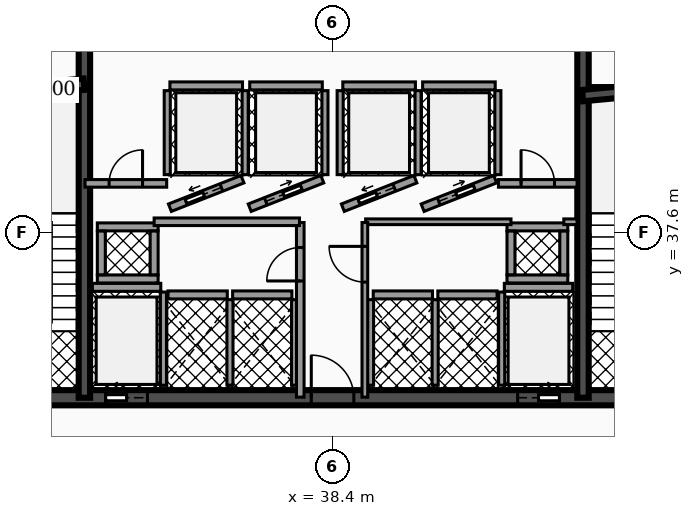
"""IFC4 building model, lengths in metres.
Left out: names, types, materials, properties, quantities, classifications, styles, units other than length and angle.
Written with IfcOpenShell. Run it as: python <this file> out.ifc"""

import sys

from ifc_helpers import new_model, si_unit, direction, frame, frame_2d, origin, place, context, subcontext, project, spatial, rectangle, extrude, element, fill, save


model = new_model("IFC4")
c1 = context("Model", 3, precision=1e-05, world=origin(), true_north=direction((0.0, 1.0)))
c2 = subcontext(c1, "Body", "Model", "MODEL_VIEW")
j1 = project(units=[si_unit("LENGTHUNIT", "METRE"), si_unit("PLANEANGLEUNIT", "RADIAN")], contexts=[c1])
p1 = place(None, origin())
s1 = spatial("IfcSite", under=j1, at=p1, CompositionType="ELEMENT")
p2 = place(p1, origin())
s2 = spatial("IfcBuilding", under=s1, at=p2, CompositionType="ELEMENT")
p3 = place(p2, frame((0.0, 0.0, 31.62)))
s3 = spatial("IfcBuildingStorey", under=s2, at=p3, CompositionType="ELEMENT", Elevation=31.62)
p4 = place(p3, frame((28.4, 33.25, 0.0), z_axis=(0.0, 0.0, 1.0), x_axis=(1.0, 0.0, 0.0)))
e1 = element("IfcWall", 1, at=p4, inside=s3, PredefinedType="SHEAR", context=c2, shape_type="SweptSolid", body=[
    extrude(rectangle(XDim=20.06, YDim=0.4, at=frame_2d((10.03, 0.0))), origin(), (0.0, 0.0, 1.0), 3.82),
])
p5 = place(p4, frame((4.03, 0.0, 0.0)))
e2 = element("IfcOpeningElement", 2, at=p5, cuts=e1, PredefinedType="OPENING", context=c2, shape_type="SweptSolid", body=[
    extrude(rectangle(XDim=1.1, YDim=2.15, at=frame_2d((0.55, 1.075))), frame((0.0, 0.21, 0.0), z_axis=(0.0, -1.0, 0.0), x_axis=(1.0, 0.0, 0.0)), (0.0, 0.0, 1.0), 0.42),
])
p6 = place(p4, frame((14.87, 0.0, 0.0)))
e3 = element("IfcOpeningElement", 3, at=p6, cuts=e1, PredefinedType="OPENING", context=c2, shape_type="SweptSolid", body=[
    extrude(rectangle(XDim=1.1, YDim=2.15, at=frame_2d((0.55, 1.075))), frame((0.0, 0.21, 0.0), z_axis=(0.0, -1.0, 0.0), x_axis=(1.0, 0.0, 0.0)), (0.0, 0.0, 1.0), 0.42),
])
p7 = place(p4, frame((1.31, 0.0, 0.0)))
e4 = element("IfcOpeningElement", 4, at=p7, cuts=e1, PredefinedType="OPENING", context=c2, shape_type="SweptSolid", body=[
    extrude(rectangle(XDim=1.1, YDim=2.2, at=frame_2d((0.55, 1.1))), frame((0.0, 0.21, 0.0), z_axis=(0.0, -1.0, 0.0), x_axis=(1.0, 0.0, 0.0)), (0.0, 0.0, 1.0), 0.42),
])
p8 = place(p4, frame((9.44, 0.0, 0.0)))
e5 = element("IfcOpeningElement", 5, at=p8, cuts=e1, PredefinedType="OPENING", context=c2, shape_type="SweptSolid", body=[
    extrude(rectangle(XDim=1.12, YDim=2.05, at=frame_2d((0.56, 1.025))), frame((0.0, 0.21, 0.0), z_axis=(0.0, -1.0, 0.0), x_axis=(1.0, 0.0, 0.0)), (0.0, 0.0, 1.0), 0.42),
])
p9 = place(p4, frame((17.65, 0.0, 0.0)))
e6 = element("IfcOpeningElement", 6, at=p9, cuts=e1, PredefinedType="OPENING", context=c2, shape_type="SweptSolid", body=[
    extrude(rectangle(XDim=1.1, YDim=2.2, at=frame_2d((0.55, 1.1))), frame((0.0, 0.21, 0.0), z_axis=(0.0, -1.0, 0.0), x_axis=(1.0, 0.0, 0.0)), (0.0, 0.0, 1.0), 0.42),
])
for number, where, z_axis, x_axis in (
    (7, (31.87, 33.25, 0.0), (0.0, 0.0, 1.0), (0.0, 1.0, 0.0)),
    (8, (44.99, 33.25, 0.0), (0.0, 0.0, 1.0), (0.0, 1.0, 0.0)),
):
    element("IfcWall", number, at=place(p3, frame(where, z_axis=z_axis, x_axis=x_axis)), inside=s3, PredefinedType="SHEAR", context=c2, shape_type="SweptSolid", body=[
        extrude(rectangle(XDim=10.2, YDim=0.3, at=frame_2d((5.1, 0.0))), origin(), (0.0, 0.0, 1.0), 3.82),
    ])
p10 = place(p3, frame((28.64, 41.2, 0.0), z_axis=(0.0, 0.0, 1.0), x_axis=(0.995687118776, 0.092774789157, 0.0)))
e9 = element("IfcWall", 9, at=p10, inside=s3, PredefinedType="SHEAR", context=c2, shape_type="SweptSolid", body=[
    extrude(rectangle(XDim=3.234, YDim=0.3, at=frame_2d((1.617, 0.0))), origin(), (0.0, 0.0, 1.0), 3.82),
])
p11 = place(p3, frame((44.98, 41.2, 0.0), z_axis=(0.0, 0.0, 1.0), x_axis=(0.995686468965, 0.09278176286, 0.0)))
e10 = element("IfcWall", 10, at=p11, inside=s3, PredefinedType="SHEAR", context=c2, shape_type="SweptSolid", body=[
    extrude(rectangle(XDim=3.234, YDim=0.3, at=frame_2d((1.617, 0.0))), origin(), (0.0, 0.0, 1.0), 3.82),
])
p12 = place(p3, frame((32.08, 36.155, 0.0), z_axis=(0.0, 0.0, 1.0), x_axis=(1.0, 0.0, 0.0)))
e11 = element("IfcWall", 11, at=p12, inside=s3, PredefinedType="SOLIDWALL", context=c2, shape_type="SweptSolid", body=[
    extrude(rectangle(XDim=1.8, YDim=0.21, at=frame_2d((0.9, 0.0))), origin(), (0.0, 0.0, 1.0), 2.792),
])
p13 = place(p3, frame((33.95, 33.58, 0.0), z_axis=(0.0, 0.0, 1.0), x_axis=(0.0, 1.0, 0.0)))
e12 = element("IfcWall", 12, at=p13, inside=s3, PredefinedType="SOLIDWALL", context=c2, shape_type="SweptSolid", body=[
    extrude(rectangle(XDim=2.45, YDim=0.16, at=frame_2d((1.225, 0.0))), origin(), (0.0, 0.0, 1.0), 2.792),
])
p14 = place(p3, frame((42.92, 36.155, 0.0), z_axis=(0.0, 0.0, 1.0), x_axis=(1.0, 0.0, 0.0)))
e13 = element("IfcWall", 13, at=p14, inside=s3, PredefinedType="SOLIDWALL", context=c2, shape_type="SweptSolid", body=[
    extrude(rectangle(XDim=1.8, YDim=0.21, at=frame_2d((0.9, 0.0))), origin(), (0.0, 0.0, 1.0), 2.792),
])
p15 = place(p3, frame((42.85, 33.58, 0.0), z_axis=(0.0, 0.0, 1.0), x_axis=(0.0, 1.0, 0.0)))
e14 = element("IfcWall", 14, at=p15, inside=s3, PredefinedType="SOLIDWALL", context=c2, shape_type="SweptSolid", body=[
    extrude(rectangle(XDim=2.45, YDim=0.16, at=frame_2d((1.225, 0.0))), origin(), (0.0, 0.0, 1.0), 2.792),
])
p16 = place(p3, frame((34.12, 38.25, 0.0), z_axis=(0.0, 0.0, 1.0), x_axis=(0.930804993012, 0.36551616241, 0.0)))
e15 = element("IfcWall", 15, at=p16, inside=s3, PredefinedType="SOLIDWALL", context=c2, shape_type="SweptSolid", body=[
    extrude(rectangle(XDim=2.052, YDim=0.21, at=frame_2d((1.026, 0.0))), origin(), (0.0, 0.0, 1.0), 2.792),
])
p17 = place(p16, frame((0.455, 0.0, 0.0)))
e16 = element("IfcOpeningElement", 16, at=p17, cuts=e15, PredefinedType="OPENING", context=c2, shape_type="SweptSolid", body=[
    extrude(rectangle(XDim=1.0, YDim=2.1, at=frame_2d((0.5, 1.05))), frame((0.0, 0.115, 0.0), z_axis=(0.0, -1.0, 0.0), x_axis=(1.0, 0.0, 0.0)), (0.0, 0.0, 1.0), 0.23),
])
p18 = place(p3, frame((34.12, 41.455, 0.0), z_axis=(0.0, 0.0, 1.0), x_axis=(1.0, 0.0, 0.0)))
e17 = element("IfcWall", 17, at=p18, inside=s3, PredefinedType="SOLIDWALL", context=c2, shape_type="SweptSolid", body=[
    extrude(rectangle(XDim=1.91, YDim=0.21, at=frame_2d((0.955, 0.0))), origin(), (0.0, 0.0, 1.0), 2.792),
])
for number, where, z_axis, x_axis in (
    (18, (34.05, 39.12, 0.0), (0.0, 0.0, 1.0), (0.0, 1.0, 0.0)),
    (19, (36.1, 39.12, 0.0), (0.0, 0.0, 1.0), (0.0, 1.0, 0.0)),
):
    element("IfcWall", number, at=place(p3, frame(where, z_axis=z_axis, x_axis=x_axis)), inside=s3, PredefinedType="SOLIDWALL", context=c2, shape_type="SweptSolid", body=[
        extrude(rectangle(XDim=2.21, YDim=0.16, at=frame_2d((1.105, 0.0))), origin(), (0.0, 0.0, 1.0), 2.792),
    ])
p19 = place(p3, frame((36.22, 38.25, 0.0), z_axis=(0.0, 0.0, 1.0), x_axis=(0.930804993012, 0.36551616241, 0.0)))
e20 = element("IfcWall", 20, at=p19, inside=s3, PredefinedType="SOLIDWALL", context=c2, shape_type="SweptSolid", body=[
    extrude(rectangle(XDim=2.052, YDim=0.21, at=frame_2d((1.026, 0.0))), origin(), (0.0, 0.0, 1.0), 2.792),
])
p20 = place(p19, frame((0.455, 0.0, 0.0)))
e21 = element("IfcOpeningElement", 21, at=p20, cuts=e20, PredefinedType="OPENING", context=c2, shape_type="SweptSolid", body=[
    extrude(rectangle(XDim=1.0, YDim=2.1, at=frame_2d((0.5, 1.05))), frame((0.0, 0.115, 0.0), z_axis=(0.0, -1.0, 0.0), x_axis=(1.0, 0.0, 0.0)), (0.0, 0.0, 1.0), 0.23),
])
p21 = place(p3, frame((36.22, 41.455, 0.0), z_axis=(0.0, 0.0, 1.0), x_axis=(1.0, 0.0, 0.0)))
e22 = element("IfcWall", 22, at=p21, inside=s3, PredefinedType="SOLIDWALL", context=c2, shape_type="SweptSolid", body=[
    extrude(rectangle(XDim=1.91, YDim=0.21, at=frame_2d((0.955, 0.0))), origin(), (0.0, 0.0, 1.0), 2.792),
])
p22 = place(p3, frame((38.2, 39.12, 0.0), z_axis=(0.0, 0.0, 1.0), x_axis=(0.0, 1.0, 0.0)))
e23 = element("IfcWall", 23, at=p22, inside=s3, PredefinedType="SOLIDWALL", context=c2, shape_type="SweptSolid", body=[
    extrude(rectangle(XDim=2.21, YDim=0.16, at=frame_2d((1.105, 0.0))), origin(), (0.0, 0.0, 1.0), 2.792),
])
p23 = place(p3, frame((38.67, 38.25, 0.0), z_axis=(0.0, 0.0, 1.0), x_axis=(0.930820886763, 0.3654756856, 0.0)))
e24 = element("IfcWall", 24, at=p23, inside=s3, PredefinedType="SOLIDWALL", context=c2, shape_type="SweptSolid", body=[
    extrude(rectangle(XDim=2.052, YDim=0.21, at=frame_2d((1.026, 0.0))), origin(), (0.0, 0.0, 1.0), 2.792),
])
p24 = place(p23, frame((0.455, 0.0, 0.0)))
e25 = element("IfcOpeningElement", 25, at=p24, cuts=e24, PredefinedType="OPENING", context=c2, shape_type="SweptSolid", body=[
    extrude(rectangle(XDim=1.0, YDim=2.1, at=frame_2d((0.5, 1.05))), frame((0.0, 0.115, 0.0), z_axis=(0.0, -1.0, 0.0), x_axis=(1.0, 0.0, 0.0)), (0.0, 0.0, 1.0), 0.23),
])
p25 = place(p3, frame((38.67, 41.455, 0.0), z_axis=(0.0, 0.0, 1.0), x_axis=(1.0, 0.0, 0.0)))
e26 = element("IfcWall", 26, at=p25, inside=s3, PredefinedType="SOLIDWALL", context=c2, shape_type="SweptSolid", body=[
    extrude(rectangle(XDim=1.91, YDim=0.21, at=frame_2d((0.955, 0.0))), origin(), (0.0, 0.0, 1.0), 2.792),
])
for number, where, z_axis, x_axis in (
    (27, (38.6, 39.12, 0.0), (0.0, 0.0, 1.0), (0.0, 1.0, 0.0)),
    (28, (40.65, 39.12, 0.0), (0.0, 0.0, 1.0), (0.0, 1.0, 0.0)),
):
    element("IfcWall", number, at=place(p3, frame(where, z_axis=z_axis, x_axis=x_axis)), inside=s3, PredefinedType="SOLIDWALL", context=c2, shape_type="SweptSolid", body=[
        extrude(rectangle(XDim=2.21, YDim=0.16, at=frame_2d((1.105, 0.0))), origin(), (0.0, 0.0, 1.0), 2.792),
    ])
p26 = place(p3, frame((40.77, 38.25, 0.0), z_axis=(0.0, 0.0, 1.0), x_axis=(0.930804993012, 0.36551616241, 0.0)))
e29 = element("IfcWall", 29, at=p26, inside=s3, PredefinedType="SOLIDWALL", context=c2, shape_type="SweptSolid", body=[
    extrude(rectangle(XDim=2.052, YDim=0.21, at=frame_2d((1.026, 0.0))), origin(), (0.0, 0.0, 1.0), 2.792),
])
p27 = place(p26, frame((0.455, 0.0, 0.0)))
e30 = element("IfcOpeningElement", 30, at=p27, cuts=e29, PredefinedType="OPENING", context=c2, shape_type="SweptSolid", body=[
    extrude(rectangle(XDim=1.0, YDim=2.1, at=frame_2d((0.5, 1.05))), frame((0.0, 0.115, 0.0), z_axis=(0.0, -1.0, 0.0), x_axis=(1.0, 0.0, 0.0)), (0.0, 0.0, 1.0), 0.23),
])
p28 = place(p3, frame((40.77, 41.455, 0.0), z_axis=(0.0, 0.0, 1.0), x_axis=(1.0, 0.0, 0.0)))
e31 = element("IfcWall", 31, at=p28, inside=s3, PredefinedType="SOLIDWALL", context=c2, shape_type="SweptSolid", body=[
    extrude(rectangle(XDim=1.91, YDim=0.21, at=frame_2d((0.955, 0.0))), origin(), (0.0, 0.0, 1.0), 2.792),
])
p29 = place(p3, frame((42.75, 39.12, 0.0), z_axis=(0.0, 0.0, 1.0), x_axis=(0.0, 1.0, 0.0)))
e32 = element("IfcWall", 32, at=p29, inside=s3, PredefinedType="SOLIDWALL", context=c2, shape_type="SweptSolid", body=[
    extrude(rectangle(XDim=2.21, YDim=0.16, at=frame_2d((1.105, 0.0))), origin(), (0.0, 0.0, 1.0), 2.792),
])
p30 = place(p3, frame((34.07, 35.955, 0.0), z_axis=(0.0, 0.0, 1.0), x_axis=(1.0, 0.0, 0.0)))
e33 = element("IfcWall", 33, at=p30, inside=s3, PredefinedType="SOLIDWALL", context=c2, shape_type="SweptSolid", body=[
    extrude(rectangle(XDim=1.56, YDim=0.21, at=frame_2d((0.78, 0.0))), origin(), (0.0, 0.0, 1.0), 2.792),
])
p31 = place(p3, frame((35.7, 33.58, 0.0), z_axis=(0.0, 0.0, 1.0), x_axis=(0.0, 1.0, 0.0)))
e34 = element("IfcWall", 34, at=p31, inside=s3, PredefinedType="SOLIDWALL", context=c2, shape_type="SweptSolid", body=[
    extrude(rectangle(XDim=2.25, YDim=0.16, at=frame_2d((1.125, 0.0))), origin(), (0.0, 0.0, 1.0), 2.792),
])
p32 = place(p3, frame((35.77, 35.955, 0.0), z_axis=(0.0, 0.0, 1.0), x_axis=(1.0, 0.0, 0.0)))
e35 = element("IfcWall", 35, at=p32, inside=s3, PredefinedType="SOLIDWALL", context=c2, shape_type="SweptSolid", body=[
    extrude(rectangle(XDim=1.56, YDim=0.21, at=frame_2d((0.78, 0.0))), origin(), (0.0, 0.0, 1.0), 2.792),
])
p33 = place(p3, frame((37.4, 33.58, 0.0), z_axis=(0.0, 0.0, 1.0), x_axis=(0.0, 1.0, 0.0)))
e36 = element("IfcWall", 36, at=p33, inside=s3, PredefinedType="SOLIDWALL", context=c2, shape_type="SweptSolid", body=[
    extrude(rectangle(XDim=2.25, YDim=0.16, at=frame_2d((1.125, 0.0))), origin(), (0.0, 0.0, 1.0), 2.792),
])
p34 = place(p3, frame((39.47, 35.955, 0.0), z_axis=(0.0, 0.0, 1.0), x_axis=(1.0, 0.0, 0.0)))
e37 = element("IfcWall", 37, at=p34, inside=s3, PredefinedType="SOLIDWALL", context=c2, shape_type="SweptSolid", body=[
    extrude(rectangle(XDim=1.56, YDim=0.21, at=frame_2d((0.78, 0.0))), origin(), (0.0, 0.0, 1.0), 2.792),
])
for number, where, z_axis, x_axis in (
    (38, (39.4, 33.58, 0.0), (0.0, 0.0, 1.0), (0.0, 1.0, 0.0)),
    (39, (41.1, 33.58, 0.0), (0.0, 0.0, 1.0), (0.0, 1.0, 0.0)),
):
    element("IfcWall", number, at=place(p3, frame(where, z_axis=z_axis, x_axis=x_axis)), inside=s3, PredefinedType="SOLIDWALL", context=c2, shape_type="SweptSolid", body=[
        extrude(rectangle(XDim=2.25, YDim=0.16, at=frame_2d((1.125, 0.0))), origin(), (0.0, 0.0, 1.0), 2.792),
    ])
p35 = place(p3, frame((41.17, 35.955, 0.0), z_axis=(0.0, 0.0, 1.0), x_axis=(1.0, 0.0, 0.0)))
e40 = element("IfcWall", 40, at=p35, inside=s3, PredefinedType="SOLIDWALL", context=c2, shape_type="SweptSolid", body=[
    extrude(rectangle(XDim=1.56, YDim=0.21, at=frame_2d((0.78, 0.0))), origin(), (0.0, 0.0, 1.0), 2.792),
])
for number, where, z_axis, x_axis in (
    (41, (32.21, 36.375, 0.0), (0.0, 0.0, 1.0), (1.0, 0.0, 0.0)),
    (42, (32.21, 37.745, 0.0), (0.0, 0.0, 1.0), (1.0, 0.0, 0.0)),
):
    element("IfcWall", number, at=place(p3, frame(where, z_axis=z_axis, x_axis=x_axis)), inside=s3, PredefinedType="SOLIDWALL", context=c2, shape_type="SweptSolid", body=[
        extrude(rectangle(XDim=1.6, YDim=0.21, at=frame_2d((0.8, 0.0))), origin(), (0.0, 0.0, 1.0), 3.82),
    ])
for number, where, z_axis, x_axis in (
    (43, (32.315, 36.485, 0.0), (0.0, 0.0, 1.0), (0.0, 1.0, 0.0)),
    (44, (33.705, 36.485, 0.0), (0.0, 0.0, 1.0), (0.0, 1.0, 0.0)),
):
    element("IfcWall", number, at=place(p3, frame(where, z_axis=z_axis, x_axis=x_axis)), inside=s3, PredefinedType="SOLIDWALL", context=c2, shape_type="SweptSolid", body=[
        extrude(rectangle(XDim=1.15, YDim=0.21, at=frame_2d((0.575, 0.0))), origin(), (0.0, 0.0, 1.0), 3.82),
    ])
for number, where, z_axis, x_axis in (
    (45, (42.99, 36.375, 0.0), (0.0, 0.0, 1.0), (1.0, 0.0, 0.0)),
    (46, (42.99, 37.745, 0.0), (0.0, 0.0, 1.0), (1.0, 0.0, 0.0)),
):
    element("IfcWall", number, at=place(p3, frame(where, z_axis=z_axis, x_axis=x_axis)), inside=s3, PredefinedType="SOLIDWALL", context=c2, shape_type="SweptSolid", body=[
        extrude(rectangle(XDim=1.6, YDim=0.21, at=frame_2d((0.8, 0.0))), origin(), (0.0, 0.0, 1.0), 3.82),
    ])
for number, where, z_axis, x_axis in (
    (47, (43.095, 36.485, 0.0), (0.0, 0.0, 1.0), (0.0, 1.0, 0.0)),
    (48, (44.485, 36.485, 0.0), (0.0, 0.0, 1.0), (0.0, 1.0, 0.0)),
):
    element("IfcWall", number, at=place(p3, frame(where, z_axis=z_axis, x_axis=x_axis)), inside=s3, PredefinedType="SOLIDWALL", context=c2, shape_type="SweptSolid", body=[
        extrude(rectangle(XDim=1.15, YDim=0.21, at=frame_2d((0.575, 0.0))), origin(), (0.0, 0.0, 1.0), 3.82),
    ])
p36 = place(p3, frame((37.55, 33.265, 0.0), z_axis=(0.0, 0.0, 1.0), x_axis=(0.0, 1.0, 0.0)))
e49 = element("IfcWall", 49, at=p36, inside=s3, PredefinedType="PARTITIONING", context=c2, shape_type="SweptSolid", body=[
    extrude(rectangle(XDim=4.595, YDim=0.2, at=frame_2d((2.298, 0.0))), origin(), (0.0, 0.0, 1.0), 2.777),
])
p37 = place(p36, frame((3.058, 0.0, 0.0)))
e50 = element("IfcOpeningElement", 50, at=p37, cuts=e49, PredefinedType="OPENING", context=c2, shape_type="SweptSolid", body=[
    extrude(rectangle(XDim=0.88, YDim=2.05, at=frame_2d((0.44, 1.025))), frame((0.0, 0.11, 0.0), z_axis=(0.0, -1.0, 0.0), x_axis=(1.0, 0.0, 0.0)), (0.0, 0.0, 1.0), 0.22),
])
p38 = place(p3, frame((33.705, 37.88, 0.0), z_axis=(0.0, 0.0, 1.0), x_axis=(1.0, 0.0, 0.0)))
e51 = element("IfcWall", 51, at=p38, inside=s3, PredefinedType="PARTITIONING", context=c2, shape_type="SweptSolid", body=[
    extrude(rectangle(XDim=3.825, YDim=0.2, at=frame_2d((1.913, 0.0))), origin(), (0.0, 0.0, 1.0), 2.777),
])
p39 = place(p3, frame((31.885, 38.89, 0.0), z_axis=(0.0, 0.0, 1.0), x_axis=(1.0, 0.0, 0.0)))
e52 = element("IfcWall", 52, at=p39, inside=s3, PredefinedType="PARTITIONING", context=c2, shape_type="SweptSolid", body=[
    extrude(rectangle(XDim=2.15, YDim=0.2, at=frame_2d((1.075, 0.0))), origin(), (0.0, 0.0, 1.0), 2.777),
])
p40 = place(p39, frame((0.635, 0.0, 0.0)))
e53 = element("IfcOpeningElement", 53, at=p40, cuts=e52, PredefinedType="OPENING", context=c2, shape_type="SweptSolid", body=[
    extrude(rectangle(XDim=0.88, YDim=2.05, at=frame_2d((0.44, 1.025))), frame((0.0, 0.11, 0.0), z_axis=(0.0, -1.0, 0.0), x_axis=(1.0, 0.0, 0.0)), (0.0, 0.0, 1.0), 0.22),
])
p41 = place(p3, frame((42.765, 38.89, 0.0), z_axis=(0.0, 0.0, 1.0), x_axis=(1.0, 0.0, 0.0)))
e54 = element("IfcWall", 54, at=p41, inside=s3, PredefinedType="PARTITIONING", context=c2, shape_type="SweptSolid", body=[
    extrude(rectangle(XDim=2.07, YDim=0.2, at=frame_2d((1.035, 0.0))), origin(), (0.0, 0.0, 1.0), 2.777),
])
p42 = place(p41, frame((0.595, 0.0, 0.0)))
e55 = element("IfcOpeningElement", 55, at=p42, cuts=e54, PredefinedType="OPENING", context=c2, shape_type="SweptSolid", body=[
    extrude(rectangle(XDim=0.88, YDim=2.05, at=frame_2d((0.44, 1.025))), frame((0.0, 0.11, 0.0), z_axis=(0.0, -1.0, 0.0), x_axis=(1.0, 0.0, 0.0)), (0.0, 0.0, 1.0), 0.22),
])
p43 = place(p3, frame((39.27, 37.88, 0.0), z_axis=(0.0, 0.0, 1.0), x_axis=(1.0, 0.0, 0.0)))
e56 = element("IfcWall", 56, at=p43, inside=s3, PredefinedType="PARTITIONING", context=c2, shape_type="SweptSolid", body=[
    extrude(rectangle(XDim=3.825, YDim=0.15, at=frame_2d((1.913, 0.0))), origin(), (0.0, 0.0, 1.0), 2.777),
])
p44 = place(p3, frame((44.485, 37.88, 0.0), z_axis=(0.0, 0.0, 1.0), x_axis=(1.0, 0.0, 0.0)))
e57 = element("IfcWall", 57, at=p44, inside=s3, PredefinedType="PARTITIONING", context=c2, shape_type="SweptSolid", body=[
    extrude(rectangle(XDim=0.35, YDim=0.15, at=frame_2d((0.175, 0.0))), origin(), (0.0, 0.0, 1.0), 2.777),
])
p45 = place(p3, frame((39.25, 33.265, 0.0), z_axis=(0.0, 0.0, 1.0), x_axis=(0.0, 1.0, 0.0)))
e58 = element("IfcWall", 58, at=p45, inside=s3, PredefinedType="PARTITIONING", context=c2, shape_type="SweptSolid", body=[
    extrude(rectangle(XDim=4.595, YDim=0.15, at=frame_2d((2.298, 0.0))), origin(), (0.0, 0.0, 1.0), 2.777),
])
p46 = place(p45, frame((3.028, 0.0, 0.0)))
e59 = element("IfcOpeningElement", 59, at=p46, cuts=e58, PredefinedType="OPENING", context=c2, shape_type="SweptSolid", body=[
    extrude(rectangle(XDim=0.94, YDim=2.05, at=frame_2d((0.47, 1.025))), frame((0.0, 0.085, 0.0), z_axis=(0.0, -1.0, 0.0), x_axis=(1.0, 0.0, 0.0)), (0.0, 0.0, 1.0), 0.17),
])
p47 = place(p5, origin())
e60 = element("IfcDoor", 60, at=p47, inside=s3, OperationType="SLIDING_TO_LEFT", PredefinedType="DOOR", context=c2, shape_type="SweptSolid", body=[
    extrude(rectangle(XDim=1.1, YDim=2.15, at=frame_2d((0.55, 1.075))), frame((0.0, 0.025, 0.0), z_axis=(0.0, -1.0, 0.0), x_axis=(1.0, 0.0, 0.0)), (0.0, 0.0, 1.0), 0.05),
])
fill(e2, e60)
p48 = place(p6, origin())
e61 = element("IfcDoor", 61, at=p48, inside=s3, OperationType="SLIDING_TO_RIGHT", PredefinedType="DOOR", context=c2, shape_type="SweptSolid", body=[
    extrude(rectangle(XDim=1.1, YDim=2.15, at=frame_2d((0.55, 1.075))), frame((0.0, 0.025, 0.0), z_axis=(0.0, -1.0, 0.0), x_axis=(1.0, 0.0, 0.0)), (0.0, 0.0, 1.0), 0.05),
])
fill(e3, e61)
p49 = place(p17, origin())
e62 = element("IfcDoor", 62, at=p49, inside=s3, OperationType="SLIDING_TO_LEFT", PredefinedType="DOOR", context=c2, shape_type="SweptSolid", body=[
    extrude(rectangle(XDim=1.0, YDim=2.1, at=frame_2d((0.5, 1.05))), frame((0.0, 0.025, 0.0), z_axis=(0.0, -1.0, 0.0), x_axis=(1.0, 0.0, 0.0)), (0.0, 0.0, 1.0), 0.05),
])
fill(e16, e62)
p50 = place(p20, origin())
e63 = element("IfcDoor", 63, at=p50, inside=s3, OperationType="SLIDING_TO_RIGHT", PredefinedType="DOOR", context=c2, shape_type="SweptSolid", body=[
    extrude(rectangle(XDim=1.0, YDim=2.1, at=frame_2d((0.5, 1.05))), frame((0.0, 0.025, 0.0), z_axis=(0.0, -1.0, 0.0), x_axis=(1.0, 0.0, 0.0)), (0.0, 0.0, 1.0), 0.05),
])
fill(e21, e63)
p51 = place(p24, origin())
e64 = element("IfcDoor", 64, at=p51, inside=s3, OperationType="SLIDING_TO_LEFT", PredefinedType="DOOR", context=c2, shape_type="SweptSolid", body=[
    extrude(rectangle(XDim=1.0, YDim=2.1, at=frame_2d((0.5, 1.05))), frame((0.0, 0.025, 0.0), z_axis=(0.0, -1.0, 0.0), x_axis=(1.0, 0.0, 0.0)), (0.0, 0.0, 1.0), 0.05),
])
fill(e25, e64)
p52 = place(p27, origin())
e65 = element("IfcDoor", 65, at=p52, inside=s3, OperationType="SLIDING_TO_RIGHT", PredefinedType="DOOR", context=c2, shape_type="SweptSolid", body=[
    extrude(rectangle(XDim=1.0, YDim=2.1, at=frame_2d((0.5, 1.05))), frame((0.0, 0.025, 0.0), z_axis=(0.0, -1.0, 0.0), x_axis=(1.0, 0.0, 0.0)), (0.0, 0.0, 1.0), 0.05),
])
fill(e30, e65)
p53 = place(p8, origin())
e66 = element("IfcDoor", 66, at=p53, inside=s3, OperationType="SINGLE_SWING_LEFT", PredefinedType="DOOR", context=c2, shape_type="SweptSolid", body=[
    extrude(rectangle(XDim=1.12, YDim=2.05, at=frame_2d((0.56, 1.025))), frame((0.0, 0.025, 0.0), z_axis=(0.0, -1.0, 0.0), x_axis=(1.0, 0.0, 0.0)), (0.0, 0.0, 1.0), 0.05),
])
fill(e5, e66)
p54 = place(p37, origin())
e67 = element("IfcDoor", 67, at=p54, inside=s3, OperationType="SINGLE_SWING_LEFT", PredefinedType="DOOR", context=c2, shape_type="SweptSolid", body=[
    extrude(rectangle(XDim=0.88, YDim=2.05, at=frame_2d((0.44, 1.025))), frame((0.0, 0.025, 0.0), z_axis=(0.0, -1.0, 0.0), x_axis=(1.0, 0.0, 0.0)), (0.0, 0.0, 1.0), 0.05),
])
fill(e50, e67)
p55 = place(p40, origin())
e68 = element("IfcDoor", 68, at=p55, inside=s3, OperationType="SINGLE_SWING_RIGHT", PredefinedType="DOOR", context=c2, shape_type="SweptSolid", body=[
    extrude(rectangle(XDim=0.88, YDim=2.05, at=frame_2d((0.44, 1.025))), frame((0.0, 0.025, 0.0), z_axis=(0.0, -1.0, 0.0), x_axis=(1.0, 0.0, 0.0)), (0.0, 0.0, 1.0), 0.05),
])
fill(e53, e68)
p56 = place(p42, origin())
e69 = element("IfcDoor", 69, at=p56, inside=s3, OperationType="SINGLE_SWING_LEFT", PredefinedType="DOOR", context=c2, shape_type="SweptSolid", body=[
    extrude(rectangle(XDim=0.88, YDim=2.05, at=frame_2d((0.44, 1.025))), frame((0.0, 0.025, 0.0), z_axis=(0.0, -1.0, 0.0), x_axis=(1.0, 0.0, 0.0)), (0.0, 0.0, 1.0), 0.05),
])
fill(e55, e69)
p57 = place(p46, origin())
e70 = element("IfcDoor", 70, at=p57, inside=s3, OperationType="SINGLE_SWING_RIGHT", PredefinedType="DOOR", context=c2, shape_type="SweptSolid", body=[
    extrude(rectangle(XDim=0.94, YDim=2.05, at=frame_2d((0.47, 1.025))), frame((0.0, 0.025, 0.0), z_axis=(0.0, -1.0, 0.0), x_axis=(1.0, 0.0, 0.0)), (0.0, 0.0, 1.0), 0.05),
])
fill(e59, e70)
save(model, sys.argv[1])
